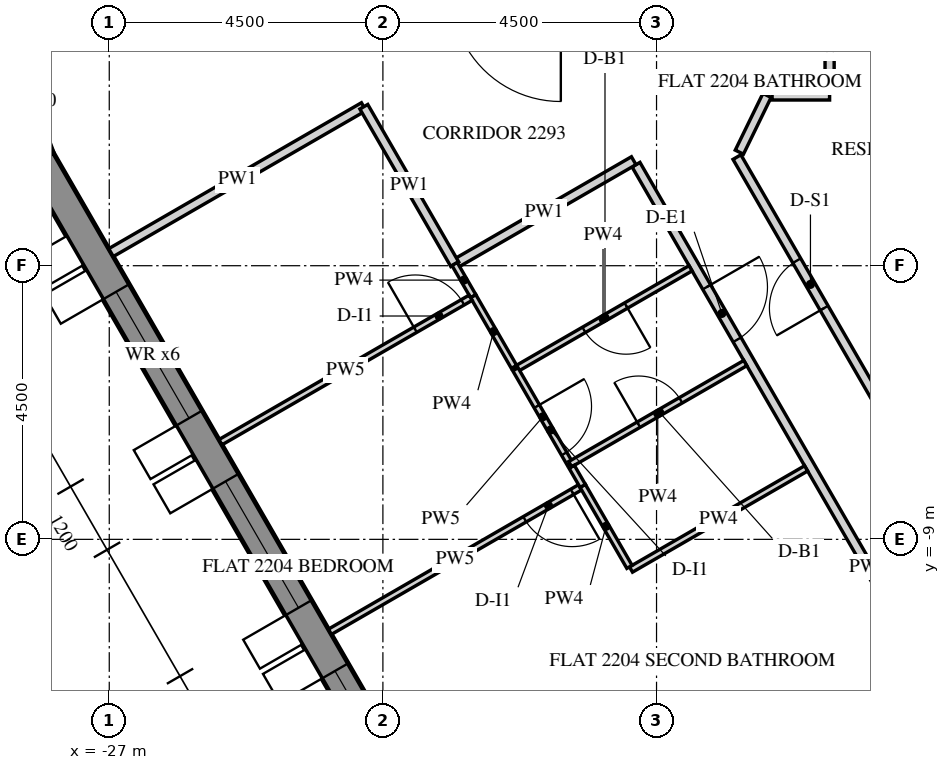
"""IFC4 building model, lengths in metres.
Left out: names, types, materials, properties, quantities, classifications, styles, units other than length and angle.
Written with IfcOpenShell. Run it as: python <this file> out.ifc"""

import sys

from ifc_helpers import new_model, si_unit, direction, frame, frame_2d, origin, place, context, subcontext, project, spatial, polyline, rectangle, outline, extrude, element, fill, save


model = new_model("IFC4")
c1 = context("Model", 3, precision=1e-05, world=origin(), true_north=direction((0.0, 1.0)))
c2 = subcontext(c1, "Body", "Model", "MODEL_VIEW")
j1 = project(units=[si_unit("LENGTHUNIT", "METRE"), si_unit("PLANEANGLEUNIT", "RADIAN")], contexts=[c1])
p1 = place(None, origin())
s1 = spatial("IfcSite", under=j1, at=p1, CompositionType="ELEMENT")
p2 = place(p1, origin())
s2 = spatial("IfcBuilding", under=s1, at=p2, CompositionType="ELEMENT")
p3 = place(p2, frame((0.0, 0.0, 279.6)))
s3 = spatial("IfcBuildingStorey", under=s2, at=p3, CompositionType="ELEMENT", Elevation=279.6)
p4 = place(p3, frame((-28.578, -1.606, -0.15), z_axis=(0.0, 0.0, 1.0), x_axis=(0.352838463023, -0.935684251771, 0.0)))
e1 = element("IfcWall", 1, at=p4, inside=s3, PredefinedType="SOLIDWALL", context=c2, shape_type="SweptSolid", body=[
    extrude(outline(polyline([(-0.041, -0.25), (1.237, -0.25), (1.196, 0.25), (0.041, 0.25), (-0.041, -0.25)])), origin(), (0.0, 0.0, 1.0), 3.9),
])
p5 = place(p3, frame((-28.149, -2.745, -0.15), z_axis=(0.0, 0.0, 1.0), x_axis=(0.500003737743, -0.866023245787, 0.0)))
e2 = element("IfcWall", 2, at=p5, inside=s3, PredefinedType="SOLIDWALL", context=c2, shape_type="SweptSolid", body=[
    extrude(outline(polyline([(-0.021, -0.25), (25.468, -0.25), (25.421, 0.25), (0.021, 0.25), (-0.021, -0.25)])), origin(), (0.0, 0.0, 1.0), 3.9),
])
p6 = place(p5, frame((2.522, 0.0, 0.75)))
e3 = element("IfcOpeningElement", 3, at=p6, cuts=e2, PredefinedType="OPENING", context=c2, shape_type="SweptSolid", body=[
    extrude(rectangle(XDim=2.4, YDim=2.7, at=frame_2d((1.2, 1.35))), frame((0.0, 0.26, 0.0), z_axis=(0.0, -1.0, 0.0), x_axis=(1.0, 0.0, 0.0)), (0.0, 0.0, 1.0), 0.52),
])
p7 = place(p5, frame((6.122, 0.0, 0.75)))
e4 = element("IfcOpeningElement", 4, at=p7, cuts=e2, PredefinedType="OPENING", context=c2, shape_type="SweptSolid", body=[
    extrude(rectangle(XDim=2.4, YDim=2.7, at=frame_2d((1.2, 1.35))), frame((0.0, 0.26, 0.0), z_axis=(0.0, -1.0, 0.0), x_axis=(1.0, 0.0, 0.0)), (0.0, 0.0, 1.0), 0.52),
])
p8 = place(p5, frame((9.722, 0.0, 0.75)))
e5 = element("IfcOpeningElement", 5, at=p8, cuts=e2, PredefinedType="OPENING", context=c2, shape_type="SweptSolid", body=[
    extrude(rectangle(XDim=2.4, YDim=2.7, at=frame_2d((1.2, 1.35))), frame((0.0, 0.26, 0.0), z_axis=(0.0, -1.0, 0.0), x_axis=(1.0, 0.0, 0.0)), (0.0, 0.0, 1.0), 0.52),
])
p9 = place(p5, frame((13.323, 0.0, 0.75)))
e6 = element("IfcOpeningElement", 6, at=p9, cuts=e2, PredefinedType="OPENING", context=c2, shape_type="SweptSolid", body=[
    extrude(rectangle(XDim=2.4, YDim=2.7, at=frame_2d((1.2, 1.35))), frame((0.0, 0.26, 0.0), z_axis=(0.0, -1.0, 0.0), x_axis=(1.0, 0.0, 0.0)), (0.0, 0.0, 1.0), 0.52),
])
p10 = place(p5, frame((16.922, 0.0, 0.75)))
e7 = element("IfcOpeningElement", 7, at=p10, cuts=e2, PredefinedType="OPENING", context=c2, shape_type="SweptSolid", body=[
    extrude(rectangle(XDim=2.4, YDim=2.7, at=frame_2d((1.2, 1.35))), frame((0.0, 0.26, 0.0), z_axis=(0.0, -1.0, 0.0), x_axis=(1.0, 0.0, 0.0)), (0.0, 0.0, 1.0), 0.52),
])
p11 = place(p5, frame((20.522, 0.0, 0.75)))
e8 = element("IfcOpeningElement", 8, at=p11, cuts=e2, PredefinedType="OPENING", context=c2, shape_type="SweptSolid", body=[
    extrude(rectangle(XDim=2.4, YDim=2.7, at=frame_2d((1.2, 1.35))), frame((0.0, 0.26, 0.0), z_axis=(0.0, -1.0, 0.0), x_axis=(1.0, 0.0, 0.0)), (0.0, 0.0, 1.0), 0.52),
])
p12 = place(p3, frame((-18.338, -2.838, 0.0), z_axis=(0.0, 0.0, 1.0), x_axis=(0.499999693481, -0.866025580753, 0.0)))
e9 = element("IfcWall", 9, at=p12, inside=s3, PredefinedType="PARTITIONING", context=c2, shape_type="SweptSolid", body=[
    extrude(rectangle(XDim=15.296, YDim=0.15, at=frame_2d((7.648, 0.0))), origin(), (0.0, 0.0, 1.0), 2.988),
])
p13 = place(p12, frame((2.325, 0.0, 0.0)))
e10 = element("IfcOpeningElement", 10, at=p13, cuts=e9, PredefinedType="OPENING", context=c2, shape_type="SweptSolid", body=[
    extrude(rectangle(XDim=1.0, YDim=2.1, at=frame_2d((0.5, 1.05))), frame((0.0, 0.085, 0.0), z_axis=(0.0, -1.0, 0.0), x_axis=(1.0, 0.0, 0.0)), (0.0, 0.0, 1.0), 0.17),
])
p14 = place(p12, frame((12.136, 0.0, 0.0)))
e11 = element("IfcOpeningElement", 11, at=p14, cuts=e9, PredefinedType="OPENING", context=c2, shape_type="SweptSolid", body=[
    extrude(rectangle(XDim=1.0, YDim=2.1, at=frame_2d((0.5, 1.05))), frame((0.0, 0.085, 0.0), z_axis=(0.0, -1.0, 0.0), x_axis=(1.0, 0.0, 0.0)), (0.0, 0.0, 1.0), 0.17),
])
p15 = place(p3, frame((-21.32, -4.473, 0.0), z_axis=(0.0, 0.0, 1.0), x_axis=(0.866007419912, 0.500031147688, 0.0)))
e12 = element("IfcWall", 12, at=p15, inside=s3, PredefinedType="PARTITIONING", context=c2, shape_type="SweptSolid", body=[
    extrude(rectangle(XDim=3.4, YDim=0.15, at=frame_2d((1.7, 0.0))), origin(), (0.0, 0.0, 1.0), 2.988),
])
p16 = place(p3, frame((-26.971, -4.284, 0.0), z_axis=(0.0, 0.0, 1.0), x_axis=(0.866017831539, 0.500013115284, 0.0)))
e13 = element("IfcWall", 13, at=p16, inside=s3, PredefinedType="PARTITIONING", context=c2, shape_type="SweptSolid", body=[
    extrude(rectangle(XDim=4.799, YDim=0.15, at=frame_2d((2.399, 0.0))), origin(), (0.0, 0.0, 1.0), 2.988),
])
p17 = place(p3, frame((-22.814, -1.885, 0.0), z_axis=(0.0, 0.0, 1.0), x_axis=(0.499983857782, -0.866034723298, 0.0)))
e14 = element("IfcWall", 14, at=p17, inside=s3, PredefinedType="PARTITIONING", context=c2, shape_type="SweptSolid", body=[
    extrude(rectangle(XDim=2.991, YDim=0.15, at=frame_2d((1.496, 0.0))), origin(), (0.0, 0.0, 1.0), 2.988),
])
p18 = place(p3, frame((-14.26, -6.901, 0.0), z_axis=(0.0, 0.0, 1.0), x_axis=(-0.499978899972, 0.866037585549, 0.0)))
e15 = element("IfcWall", 15, at=p18, inside=s3, PredefinedType="PARTITIONING", context=c2, shape_type="SweptSolid", body=[
    extrude(rectangle(XDim=4.835, YDim=0.15, at=frame_2d((2.417, 0.0))), origin(), (0.0, 0.0, 1.0), 2.988),
])
p19 = place(p18, frame((1.967, 0.0, 0.0)))
e16 = element("IfcOpeningElement", 16, at=p19, cuts=e15, PredefinedType="OPENING", context=c2, shape_type="SweptSolid", body=[
    extrude(rectangle(XDim=0.9, YDim=2.1, at=frame_2d((0.45, 1.05))), frame((0.0, 0.085, 0.0), z_axis=(0.0, -1.0, 0.0), x_axis=(1.0, 0.0, 0.0)), (0.0, 0.0, 1.0), 0.17),
])
p20 = place(p3, frame((-16.638, -2.632, 0.0), z_axis=(0.0, 0.0, 1.0), x_axis=(0.438437541994, 0.898761660158, 0.0)))
e17 = element("IfcWall", 17, at=p20, inside=s3, PredefinedType="PARTITIONING", context=c2, shape_type="SweptSolid", body=[
    extrude(rectangle(XDim=1.037, YDim=0.15, at=frame_2d((0.519, 0.0))), origin(), (0.0, 0.0, 1.0), 2.988),
])
p21 = place(p3, frame((-16.1, -1.7, 0.0), z_axis=(0.0, 0.0, 1.0), x_axis=(1.0, 0.0, 0.0)))
e18 = element("IfcWall", 18, at=p21, inside=s3, PredefinedType="PARTITIONING", context=c2, shape_type="SweptSolid", body=[
    extrude(rectangle(XDim=0.946, YDim=0.15, at=frame_2d((0.473, 0.0))), origin(), (0.0, 0.0, 1.0), 2.988),
])
p22 = place(p3, frame((-15.154, -1.625, 0.0), z_axis=(0.0, 0.0, 1.0), x_axis=(0.0, 1.0, 0.0)))
e19 = element("IfcWall", 19, at=p22, inside=s3, PredefinedType="PARTITIONING", context=c2, shape_type="SweptSolid", body=[
    extrude(rectangle(XDim=1.425, YDim=0.15, at=frame_2d((0.712, 0.0))), origin(), (0.0, 0.0, 1.0), 2.988),
])
p23 = place(p3, frame((-19.258, -8.145, 0.0), z_axis=(0.0, 0.0, 1.0), x_axis=(-0.866033238375, -0.499986429846, 0.0)))
e20 = element("IfcWall", 20, at=p23, inside=s3, PredefinedType="PARTITIONING", context=c2, shape_type="SweptSolid", body=[
    extrude(rectangle(XDim=4.75, YDim=0.1, at=frame_2d((2.375, 0.0))), origin(), (0.0, 0.0, 1.0), 2.988),
])
p24 = place(p23, frame((0.15, 0.0, 0.0)))
e21 = element("IfcOpeningElement", 21, at=p24, cuts=e20, PredefinedType="OPENING", context=c2, shape_type="SweptSolid", body=[
    extrude(rectangle(XDim=0.9, YDim=2.1, at=frame_2d((0.45, 1.05))), frame((0.0, 0.06, 0.0), z_axis=(0.0, -1.0, 0.0), x_axis=(1.0, 0.0, 0.0)), (0.0, 0.0, 1.0), 0.12),
])
p25 = place(p3, frame((-15.54, -7.833, 0.0), z_axis=(0.0, 0.0, 1.0), x_axis=(-0.866020521143, -0.500008456887, 0.0)))
e22 = element("IfcWall", 22, at=p25, inside=s3, PredefinedType="PARTITIONING", context=c2, shape_type="SweptSolid", body=[
    extrude(rectangle(XDim=3.325, YDim=0.1, at=frame_2d((1.663, 0.0))), origin(), (0.0, 0.0, 1.0), 2.988),
])
p26 = place(p3, frame((-18.445, -9.453, 0.0), z_axis=(0.0, 0.0, 1.0), x_axis=(-0.500024172624, 0.866011447264, 0.0)))
e23 = element("IfcWall", 23, at=p26, inside=s3, PredefinedType="PARTITIONING", context=c2, shape_type="SweptSolid", body=[
    extrude(rectangle(XDim=1.541, YDim=0.1, at=frame_2d((0.771, 0.0))), origin(), (0.0, 0.0, 1.0), 2.988),
])
p27 = place(p3, frame((-17.44, -4.542, 0.0), z_axis=(0.0, 0.0, 1.0), x_axis=(-0.866020521143, -0.500008456887, 0.0)))
e24 = element("IfcWall", 24, at=p27, inside=s3, PredefinedType="PARTITIONING", context=c2, shape_type="SweptSolid", body=[
    extrude(rectangle(XDim=3.325, YDim=0.1, at=frame_2d((1.663, 0.0))), origin(), (0.0, 0.0, 1.0), 2.988),
])
p28 = place(p27, frame((1.225, 0.0, 0.0)))
e25 = element("IfcOpeningElement", 25, at=p28, cuts=e24, PredefinedType="OPENING", context=c2, shape_type="SweptSolid", body=[
    extrude(rectangle(XDim=0.8, YDim=2.1, at=frame_2d((0.4, 1.05))), frame((0.0, 0.06, 0.0), z_axis=(0.0, -1.0, 0.0), x_axis=(1.0, 0.0, 0.0)), (0.0, 0.0, 1.0), 0.12),
])
p29 = place(p3, frame((-20.321, -6.203, 0.0), z_axis=(0.0, 0.0, 1.0), x_axis=(0.500054364951, -0.86599401389, 0.0)))
e26 = element("IfcWall", 26, at=p29, inside=s3, PredefinedType="PARTITIONING", context=c2, shape_type="SweptSolid", body=[
    extrude(rectangle(XDim=1.804, YDim=0.1, at=frame_2d((0.902, 0.0))), origin(), (0.0, 0.0, 1.0), 2.988),
])
p30 = place(p29, frame((0.704, 0.0, 0.0)))
e27 = element("IfcOpeningElement", 27, at=p30, cuts=e26, PredefinedType="OPENING", context=c2, shape_type="SweptSolid", body=[
    extrude(rectangle(XDim=0.9, YDim=2.1, at=frame_2d((0.45, 1.05))), frame((0.0, 0.06, 0.0), z_axis=(0.0, -1.0, 0.0), x_axis=(1.0, 0.0, 0.0)), (0.0, 0.0, 1.0), 0.12),
])
p31 = place(p3, frame((-19.42, -7.764, 0.0), z_axis=(0.0, 0.0, 1.0), x_axis=(0.866002163101, 0.500040251884, 0.0)))
e28 = element("IfcWall", 28, at=p31, inside=s3, PredefinedType="PARTITIONING", context=c2, shape_type="SweptSolid", body=[
    extrude(rectangle(XDim=3.325, YDim=0.1, at=frame_2d((1.663, 0.0))), origin(), (0.0, 0.0, 1.0), 2.988),
])
p32 = place(p31, frame((1.3, 0.0, 0.0)))
e29 = element("IfcOpeningElement", 29, at=p32, cuts=e28, PredefinedType="OPENING", context=c2, shape_type="SweptSolid", body=[
    extrude(rectangle(XDim=0.8, YDim=2.1, at=frame_2d((0.4, 1.05))), frame((0.0, 0.06, 0.0), z_axis=(0.0, -1.0, 0.0), x_axis=(1.0, 0.0, 0.0)), (0.0, 0.0, 1.0), 0.12),
])
p33 = place(p3, frame((-21.321, -4.471, 0.0), z_axis=(0.0, 0.0, 1.0), x_axis=(0.499779910804, -0.866152435058, 0.0)))
e30 = element("IfcWall", 30, at=p33, inside=s3, PredefinedType="PARTITIONING", context=c2, shape_type="SweptSolid", body=[
    extrude(rectangle(XDim=0.613, YDim=0.1, at=frame_2d((0.307, 0.0))), origin(), (0.0, 0.0, 1.0), 2.988),
])
p34 = place(p3, frame((-21.014, -5.002, 0.0), z_axis=(0.0, 0.0, 1.0), x_axis=(0.500074377092, -0.865982457891, 0.0)))
e31 = element("IfcWall", 31, at=p34, inside=s3, PredefinedType="PARTITIONING", context=c2, shape_type="SweptSolid", body=[
    extrude(rectangle(XDim=1.341, YDim=0.1, at=frame_2d((0.67, 0.0))), origin(), (0.0, 0.0, 1.0), 2.988),
])
p35 = place(p3, frame((-25.171, -7.402, 0.0), z_axis=(0.0, 0.0, 1.0), x_axis=(0.866020389056, 0.500008685663, 0.0)))
e32 = element("IfcWall", 32, at=p35, inside=s3, PredefinedType="PARTITIONING", context=c2, shape_type="SweptSolid", body=[
    extrude(rectangle(XDim=4.75, YDim=0.1, at=frame_2d((2.375, 0.0))), origin(), (0.0, 0.0, 1.0), 2.988),
])
p36 = place(p35, frame((3.7, 0.0, 0.0)))
e33 = element("IfcOpeningElement", 33, at=p36, cuts=e32, PredefinedType="OPENING", context=c2, shape_type="SweptSolid", body=[
    extrude(rectangle(XDim=0.9, YDim=2.1, at=frame_2d((0.45, 1.05))), frame((0.0, 0.06, 0.0), z_axis=(0.0, -1.0, 0.0), x_axis=(1.0, 0.0, 0.0)), (0.0, 0.0, 1.0), 0.12),
])
p37 = place(p3, frame((-19.213, -8.122, 0.0), z_axis=(0.0, 0.0, 1.0), x_axis=(-0.499683639304, 0.866207977689, 0.0)))
e34 = element("IfcWall", 34, at=p37, inside=s3, PredefinedType="PARTITIONING", context=c2, shape_type="SweptSolid", body=[
    extrude(rectangle(XDim=0.363, YDim=0.1, at=frame_2d((0.182, 0.0))), origin(), (0.0, 0.0, 1.0), 2.988),
])
p38 = place(p6, frame((0.0, 0.18, 0.0)))
e35 = element("IfcWindow", 35, at=p38, inside=s3, PartitioningType="DOUBLE_PANEL_VERTICAL", PredefinedType="WINDOW", context=c2, shape_type="SweptSolid", body=[
    extrude(rectangle(XDim=2.4, YDim=2.7, at=frame_2d((1.2, 1.35))), frame((0.0, 0.03, 0.0), z_axis=(0.0, -1.0, 0.0), x_axis=(1.0, 0.0, 0.0)), (0.0, 0.0, 1.0), 0.06),
])
fill(e3, e35)
p39 = place(p7, frame((0.0, 0.18, 0.0)))
e36 = element("IfcWindow", 36, at=p39, inside=s3, PartitioningType="DOUBLE_PANEL_VERTICAL", PredefinedType="WINDOW", context=c2, shape_type="SweptSolid", body=[
    extrude(rectangle(XDim=2.4, YDim=2.7, at=frame_2d((1.2, 1.35))), frame((0.0, 0.03, 0.0), z_axis=(0.0, -1.0, 0.0), x_axis=(1.0, 0.0, 0.0)), (0.0, 0.0, 1.0), 0.06),
])
fill(e4, e36)
p40 = place(p8, frame((0.0, 0.18, 0.0)))
e37 = element("IfcWindow", 37, at=p40, inside=s3, PartitioningType="DOUBLE_PANEL_VERTICAL", PredefinedType="WINDOW", context=c2, shape_type="SweptSolid", body=[
    extrude(rectangle(XDim=2.4, YDim=2.7, at=frame_2d((1.2, 1.35))), frame((0.0, 0.03, 0.0), z_axis=(0.0, -1.0, 0.0), x_axis=(1.0, 0.0, 0.0)), (0.0, 0.0, 1.0), 0.06),
])
fill(e5, e37)
p41 = place(p13, origin())
e38 = element("IfcDoor", 38, at=p41, inside=s3, OperationType="SINGLE_SWING_RIGHT", PredefinedType="DOOR", context=c2, shape_type="SweptSolid", body=[
    extrude(rectangle(XDim=1.0, YDim=2.1, at=frame_2d((0.5, 1.05))), frame((0.0, 0.025, 0.0), z_axis=(0.0, -1.0, 0.0), x_axis=(1.0, 0.0, 0.0)), (0.0, 0.0, 1.0), 0.05),
])
fill(e10, e38)
p42 = place(p28, origin())
e39 = element("IfcDoor", 39, at=p42, inside=s3, OperationType="SINGLE_SWING_RIGHT", PredefinedType="DOOR", context=c2, shape_type="SweptSolid", body=[
    extrude(rectangle(XDim=0.8, YDim=2.1, at=frame_2d((0.4, 1.05))), frame((0.0, 0.025, 0.0), z_axis=(0.0, -1.0, 0.0), x_axis=(1.0, 0.0, 0.0)), (0.0, 0.0, 1.0), 0.05),
])
fill(e25, e39)
p43 = place(p30, origin())
e40 = element("IfcDoor", 40, at=p43, inside=s3, OperationType="SINGLE_SWING_RIGHT", PredefinedType="DOOR", context=c2, shape_type="SweptSolid", body=[
    extrude(rectangle(XDim=0.9, YDim=2.1, at=frame_2d((0.45, 1.05))), frame((0.0, 0.025, 0.0), z_axis=(0.0, -1.0, 0.0), x_axis=(1.0, 0.0, 0.0)), (0.0, 0.0, 1.0), 0.05),
])
fill(e27, e40)
p44 = place(p36, origin())
e41 = element("IfcDoor", 41, at=p44, inside=s3, OperationType="SINGLE_SWING_RIGHT", PredefinedType="DOOR", context=c2, shape_type="SweptSolid", body=[
    extrude(rectangle(XDim=0.9, YDim=2.1, at=frame_2d((0.45, 1.05))), frame((0.0, 0.025, 0.0), z_axis=(0.0, -1.0, 0.0), x_axis=(1.0, 0.0, 0.0)), (0.0, 0.0, 1.0), 0.05),
])
fill(e33, e41)
p45 = place(p24, origin())
e42 = element("IfcDoor", 42, at=p45, inside=s3, OperationType="SINGLE_SWING_RIGHT", PredefinedType="DOOR", context=c2, shape_type="SweptSolid", body=[
    extrude(rectangle(XDim=0.9, YDim=2.1, at=frame_2d((0.45, 1.05))), frame((0.0, 0.025, 0.0), z_axis=(0.0, -1.0, 0.0), x_axis=(1.0, 0.0, 0.0)), (0.0, 0.0, 1.0), 0.05),
])
fill(e21, e42)
p46 = place(p32, origin())
e43 = element("IfcDoor", 43, at=p46, inside=s3, OperationType="SINGLE_SWING_LEFT", PredefinedType="DOOR", context=c2, shape_type="SweptSolid", body=[
    extrude(rectangle(XDim=0.8, YDim=2.1, at=frame_2d((0.4, 1.05))), frame((0.0, 0.025, 0.0), z_axis=(0.0, -1.0, 0.0), x_axis=(1.0, 0.0, 0.0)), (0.0, 0.0, 1.0), 0.05),
])
fill(e29, e43)
p47 = place(p19, origin())
e44 = element("IfcDoor", 44, at=p47, inside=s3, OperationType="SINGLE_SWING_RIGHT", PredefinedType="DOOR", context=c2, shape_type="SweptSolid", body=[
    extrude(rectangle(XDim=0.9, YDim=2.1, at=frame_2d((0.45, 1.05))), frame((0.0, 0.025, 0.0), z_axis=(0.0, -1.0, 0.0), x_axis=(1.0, 0.0, 0.0)), (0.0, 0.0, 1.0), 0.05),
])
fill(e16, e44)
save(model, sys.argv[1])
